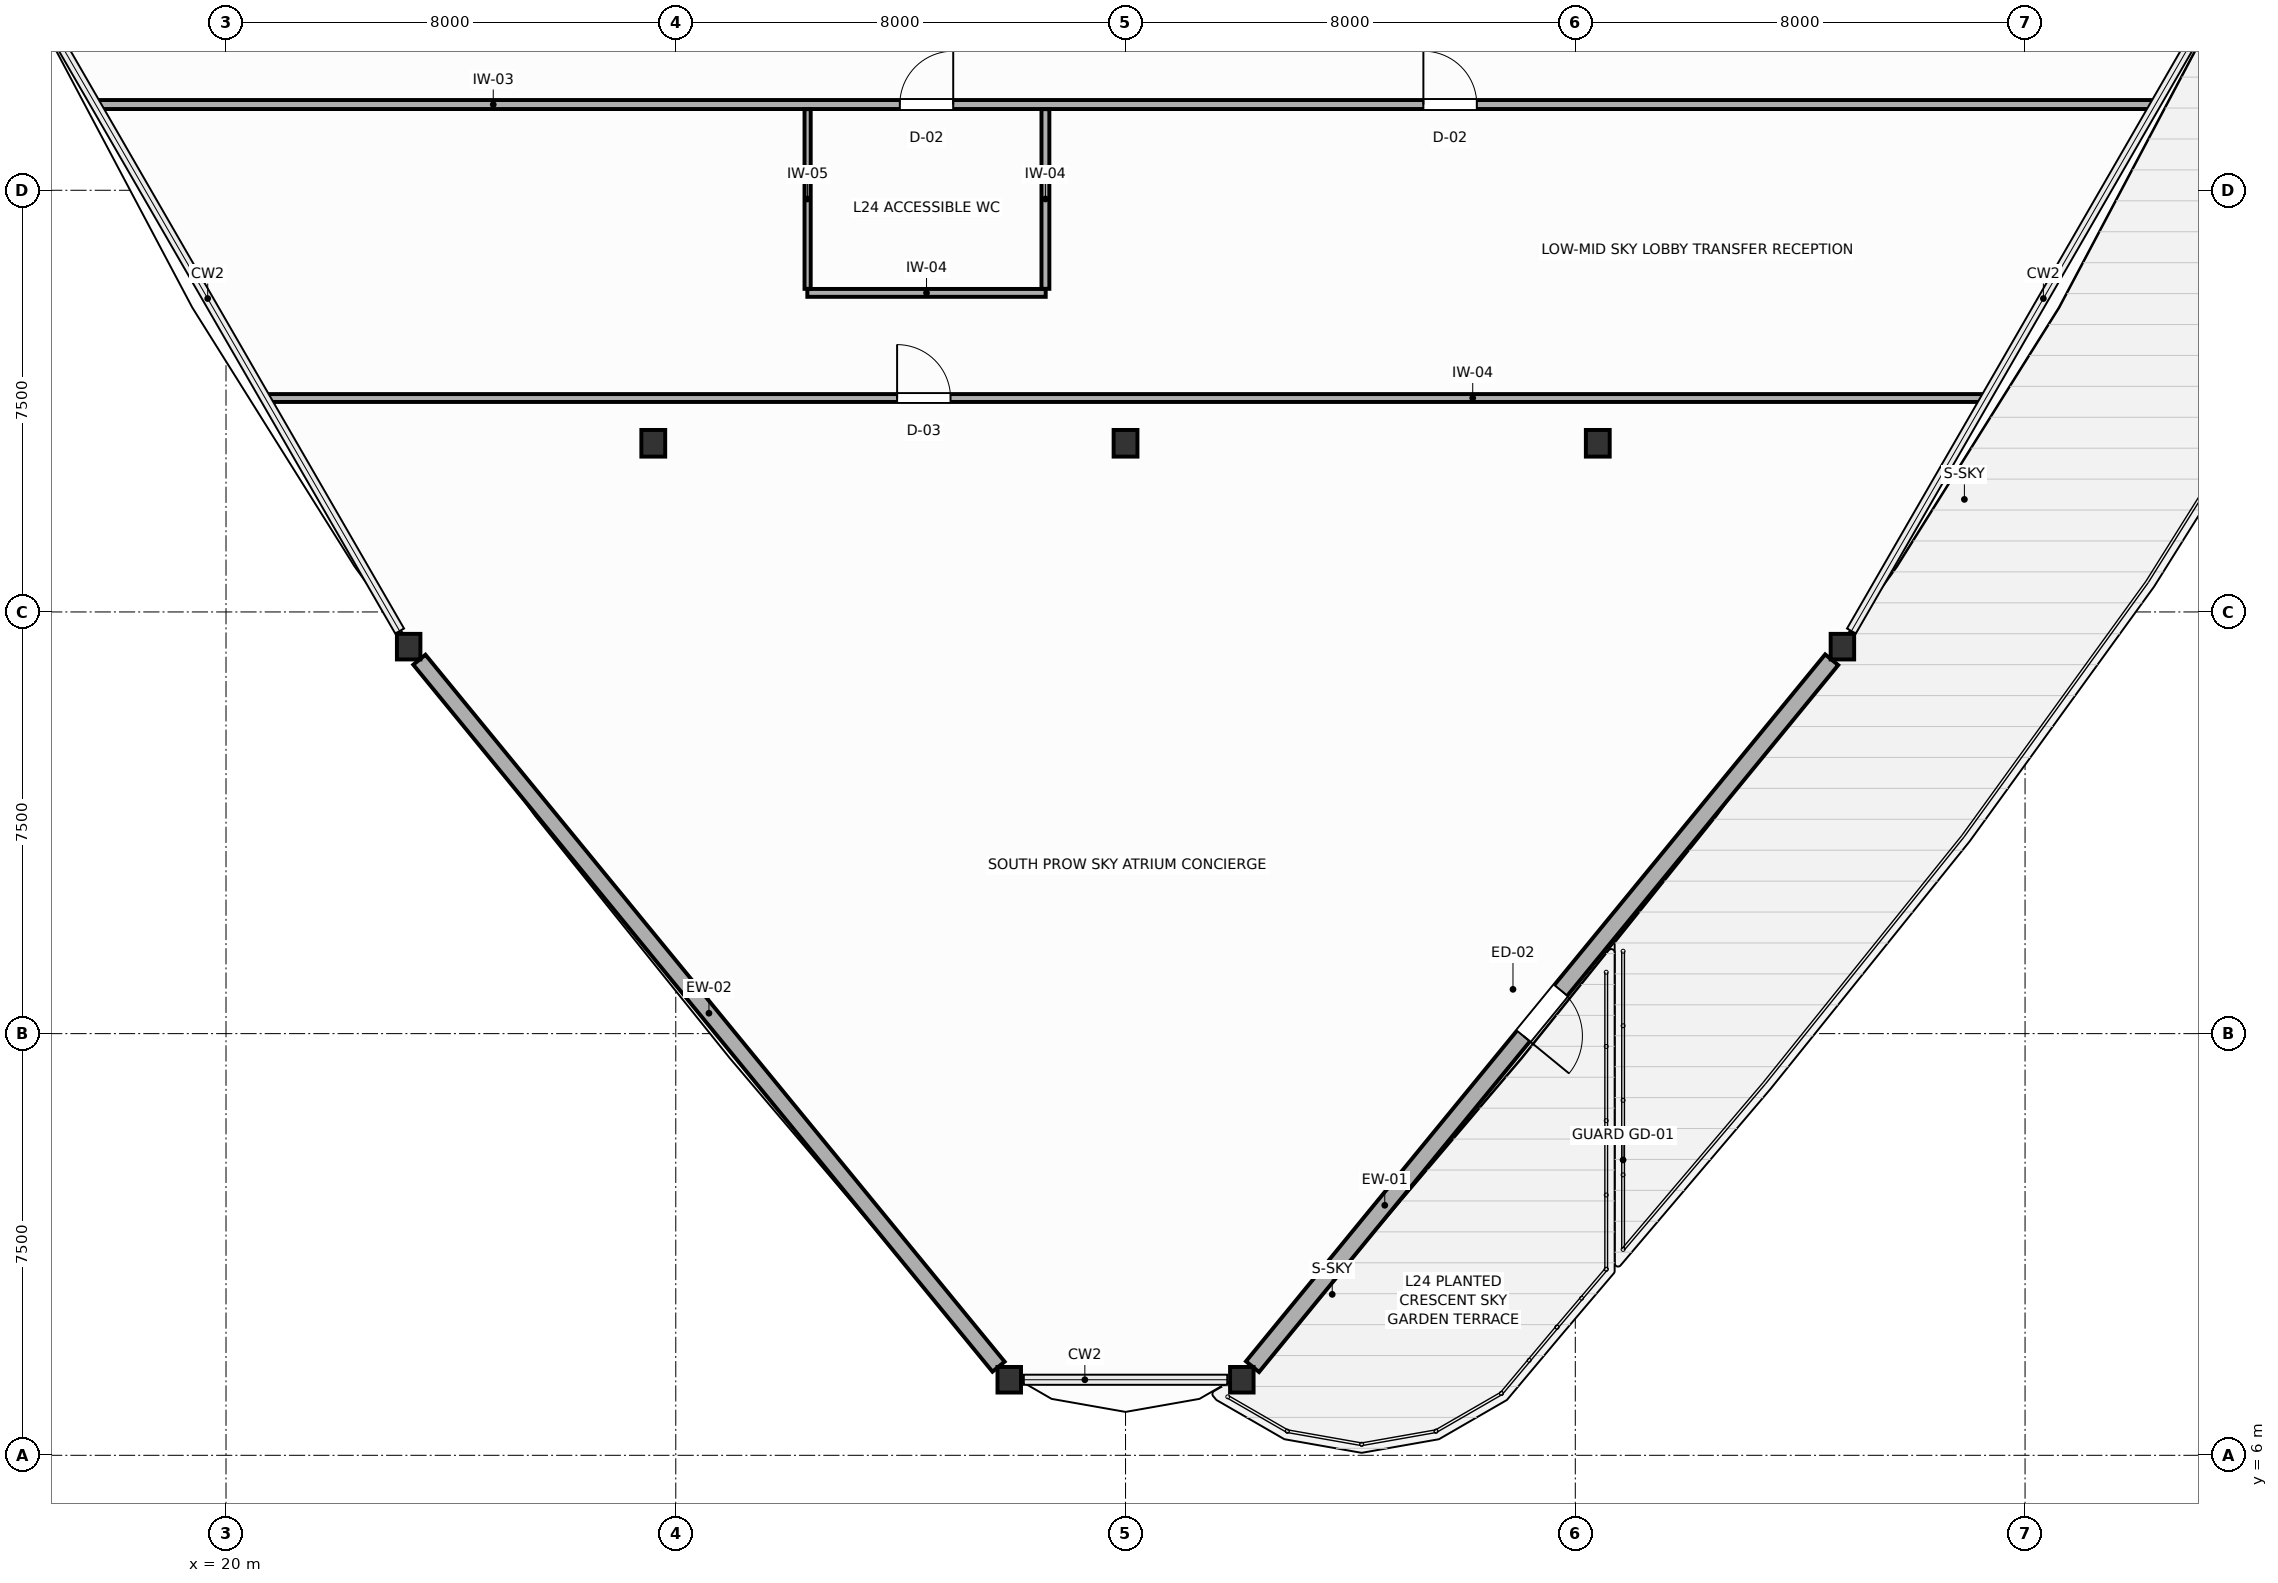
"""IFC4 building model, lengths in metres.
Left out: names, types, materials, properties, quantities, classifications, styles, units other than length and angle.
Written with IfcOpenShell. Run it as: python <this file> out.ifc"""

import sys

from ifc_helpers import new_model, si_unit, direction, frame, frame_2d, origin, origin_2d, place, context, subcontext, project, spatial, rectangle, i_section, extrude, source, transform, mapped, element, fill, save


model = new_model("IFC4")
c1 = context("Model", 3, precision=1e-05, world=origin(), true_north=direction((0.0, 1.0)))
c2 = subcontext(c1, "Body", "Model", "MODEL_VIEW")
j1 = project(units=[si_unit("LENGTHUNIT", "METRE"), si_unit("PLANEANGLEUNIT", "RADIAN")], contexts=[c1])
p1 = place(None, origin())
s1 = spatial("IfcSite", under=j1, at=p1, CompositionType="ELEMENT")
p2 = place(p1, origin())
s2 = spatial("IfcBuilding", under=s1, at=p2, CompositionType="ELEMENT")
p3 = place(p2, frame((0.0, 0.0, 99.0)))
s3 = spatial("IfcBuildingStorey", under=s2, at=p3, CompositionType="ELEMENT", Elevation=99.0)
m1 = source(origin(), c2, "Body", "SweptSolid", [
    extrude(i_section(OverallWidth=0.424, OverallDepth=0.474, WebThickness=0.045, FlangeThickness=0.072, FilletRadius=0.015, at=origin_2d()), origin(), (0.0, 0.0, 1.0), 3.6),
])
for number, where, z_axis, x_axis in (
    (1, (27.6, 24.0, 0.0), (0.0, 0.0, 1.0), (1.0, 0.0, 0.0)),
    (2, (44.4, 24.0, 0.0), (0.0, 0.0, 1.0), (1.0, 0.0, 0.0)),
    (3, (36.0, 24.0, 0.0), (0.0, 0.0, 1.0), (1.0, 0.0, 0.0)),
):
    element("IfcColumn", number, at=place(p3, frame(where, z_axis=z_axis, x_axis=x_axis)), inside=s3, PredefinedType="COLUMN", context=c2, shape_type="MappedRepresentation", body=[
        mapped(m1, transform((0.0, 0.0, 0.0), scale=1.0)),
    ])
m2 = source(origin(), c2, "Body", "SweptSolid", [
    extrude(i_section(OverallWidth=0.418, OverallDepth=0.455, WebThickness=0.039, FlangeThickness=0.063, FilletRadius=0.015, at=origin_2d()), origin(), (0.0, 0.0, 1.0), 3.6),
])
for number, where, z_axis, x_axis in (
    (4, (23.249, 20.383, 0.0), (0.0, 0.0, 1.0), (1.0, 0.0, 0.0)),
    (5, (33.932, 7.344, 0.0), (0.0, 0.0, 1.0), (1.0, 0.0, 0.0)),
    (6, (38.068, 7.344, 0.0), (0.0, 0.0, 1.0), (1.0, 0.0, 0.0)),
    (7, (48.751, 20.383, 0.0), (0.0, 0.0, 1.0), (1.0, 0.0, 0.0)),
):
    element("IfcColumn", number, at=place(p3, frame(where, z_axis=z_axis, x_axis=x_axis)), inside=s3, PredefinedType="COLUMN", context=c2, shape_type="MappedRepresentation", body=[
        mapped(m2, transform((0.0, 0.0, 0.0), scale=1.0)),
    ])
p4 = place(p3, frame((23.439, 20.15, 0.0), z_axis=(0.0, 0.0, 1.0), x_axis=(0.633768446385, -0.773522822137, 0.0)))
e8 = element("IfcWall", 8, at=p4, inside=s3, PredefinedType="SOLIDWALL", context=c2, shape_type="SweptSolid", body=[
    extrude(rectangle(XDim=16.255, YDim=0.28, at=frame_2d((8.127, 0.0))), origin(), (0.0, 0.0, 1.0), 3.0),
])
p5 = place(p3, frame((38.259, 7.576, 0.0), z_axis=(0.0, 0.0, 1.0), x_axis=(0.633768446385, 0.773522822137, 0.0)))
e9 = element("IfcWall", 9, at=p5, inside=s3, PredefinedType="SOLIDWALL", context=c2, shape_type="SweptSolid", body=[
    extrude(rectangle(XDim=16.255, YDim=0.3, at=frame_2d((8.127, 0.0))), origin(), (0.0, 0.0, 1.0), 3.0),
])
p6 = place(p5, frame((7.603, 0.0, 0.0)))
e10 = element("IfcOpeningElement", 10, at=p6, cuts=e9, PredefinedType="OPENING", context=c2, shape_type="SweptSolid", body=[
    extrude(rectangle(XDim=1.05, YDim=2.1, at=frame_2d((0.525, 1.05))), frame((0.0, 0.16, 0.0), z_axis=(0.0, -1.0, 0.0), x_axis=(1.0, 0.0, 0.0)), (0.0, 0.0, 1.0), 0.32),
])
p7 = place(p3, frame((17.702, 30.025, 0.0), z_axis=(0.0, 0.0, 1.0), x_axis=(1.0, 0.0, 0.0)))
e11 = element("IfcWall", 11, at=p7, inside=s3, PredefinedType="PARTITIONING", context=c2, shape_type="SweptSolid", body=[
    extrude(rectangle(XDim=36.596, YDim=0.16, at=frame_2d((18.298, 0.0))), origin(), (0.0, 0.0, 1.0), 3.4),
])
p8 = place(p7, frame((14.283, 0.0, 0.0)))
e12 = element("IfcOpeningElement", 12, at=p8, cuts=e11, PredefinedType="OPENING", context=c2, shape_type="SweptSolid", body=[
    extrude(rectangle(XDim=0.95, YDim=2.05, at=frame_2d((0.475, 1.025))), frame((0.0, 0.09, 0.0), z_axis=(0.0, -1.0, 0.0), x_axis=(1.0, 0.0, 0.0)), (0.0, 0.0, 1.0), 0.18),
])
p9 = place(p7, frame((23.596, 0.0, 0.0)))
e13 = element("IfcOpeningElement", 13, at=p9, cuts=e11, PredefinedType="OPENING", context=c2, shape_type="SweptSolid", body=[
    extrude(rectangle(XDim=0.95, YDim=2.05, at=frame_2d((0.475, 1.025))), frame((0.0, 0.09, 0.0), z_axis=(0.0, -1.0, 0.0), x_axis=(1.0, 0.0, 0.0)), (0.0, 0.0, 1.0), 0.18),
])
p10 = place(p3, frame((20.716, 24.805, 0.0), z_axis=(0.0, 0.0, 1.0), x_axis=(1.0, 0.0, 0.0)))
e14 = element("IfcWall", 14, at=p10, inside=s3, PredefinedType="PARTITIONING", context=c2, shape_type="SweptSolid", body=[
    extrude(rectangle(XDim=30.569, YDim=0.14, at=frame_2d((15.284, 0.0))), origin(), (0.0, 0.0, 1.0), 3.4),
])
p11 = place(p10, frame((11.221, 0.0, 0.0)))
e15 = element("IfcOpeningElement", 15, at=p11, cuts=e14, PredefinedType="OPENING", context=c2, shape_type="SweptSolid", body=[
    extrude(rectangle(XDim=0.95, YDim=2.05, at=frame_2d((0.475, 1.025))), frame((0.0, 0.08, 0.0), z_axis=(0.0, -1.0, 0.0), x_axis=(1.0, 0.0, 0.0)), (0.0, 0.0, 1.0), 0.16),
])
p12 = place(p3, frame((30.34, 26.675, 0.0), z_axis=(0.0, 0.0, 1.0), x_axis=(1.0, 0.0, 0.0)))
e16 = element("IfcWall", 16, at=p12, inside=s3, PredefinedType="PARTITIONING", context=c2, shape_type="SweptSolid", body=[
    extrude(rectangle(XDim=4.24, YDim=0.14, at=frame_2d((2.12, 0.0))), origin(), (0.0, 0.0, 1.0), 3.4),
])
p13 = place(p3, frame((34.575, 26.747, 0.0), z_axis=(0.0, 0.0, 1.0), x_axis=(0.0, 1.0, 0.0)))
e17 = element("IfcWall", 17, at=p13, inside=s3, PredefinedType="PARTITIONING", context=c2, shape_type="SweptSolid", body=[
    extrude(rectangle(XDim=3.196, YDim=0.14, at=frame_2d((1.598, 0.0))), origin(), (0.0, 0.0, 1.0), 3.4),
])
p14 = place(p3, frame((30.345, 26.747, 0.0), z_axis=(0.0, 0.0, 1.0), x_axis=(0.0, 1.0, 0.0)))
e18 = element("IfcWall", 18, at=p14, inside=s3, PredefinedType="MOVABLE", context=c2, shape_type="SweptSolid", body=[
    extrude(rectangle(XDim=3.196, YDim=0.11, at=frame_2d((1.598, 0.0))), origin(), (0.0, 0.0, 1.0), 3.4),
])
p15 = place(p6, frame((1.05, 0.0, 0.0), z_axis=(0.0, 0.0, 1.0), x_axis=(-1.0, 0.0, 0.0)))
e19 = element("IfcDoor", 19, at=p15, inside=s3, OperationType="SINGLE_SWING_RIGHT", PredefinedType="DOOR", context=c2, shape_type="SweptSolid", body=[
    extrude(rectangle(XDim=1.05, YDim=2.1, at=frame_2d((0.525, 1.05))), frame((0.0, 0.025, 0.0), z_axis=(0.0, -1.0, 0.0), x_axis=(1.0, 0.0, 0.0)), (0.0, 0.0, 1.0), 0.05),
])
fill(e10, e19)
p16 = place(p8, origin())
e20 = element("IfcDoor", 20, at=p16, inside=s3, OperationType="SINGLE_SWING_RIGHT", PredefinedType="DOOR", context=c2, shape_type="SweptSolid", body=[
    extrude(rectangle(XDim=0.95, YDim=2.05, at=frame_2d((0.475, 1.025))), frame((0.0, 0.025, 0.0), z_axis=(0.0, -1.0, 0.0), x_axis=(1.0, 0.0, 0.0)), (0.0, 0.0, 1.0), 0.05),
])
fill(e12, e20)
p17 = place(p9, origin())
e21 = element("IfcDoor", 21, at=p17, inside=s3, OperationType="SINGLE_SWING_LEFT", PredefinedType="DOOR", context=c2, shape_type="SweptSolid", body=[
    extrude(rectangle(XDim=0.95, YDim=2.05, at=frame_2d((0.475, 1.025))), frame((0.0, 0.025, 0.0), z_axis=(0.0, -1.0, 0.0), x_axis=(1.0, 0.0, 0.0)), (0.0, 0.0, 1.0), 0.05),
])
fill(e13, e21)
p18 = place(p11, origin())
e22 = element("IfcDoor", 22, at=p18, inside=s3, OperationType="SINGLE_SWING_LEFT", PredefinedType="DOOR", context=c2, shape_type="SweptSolid", body=[
    extrude(rectangle(XDim=0.95, YDim=2.05, at=frame_2d((0.475, 1.025))), frame((0.0, 0.025, 0.0), z_axis=(0.0, -1.0, 0.0), x_axis=(1.0, 0.0, 0.0)), (0.0, 0.0, 1.0), 0.05),
])
fill(e15, e22)
save(model, sys.argv[1])
